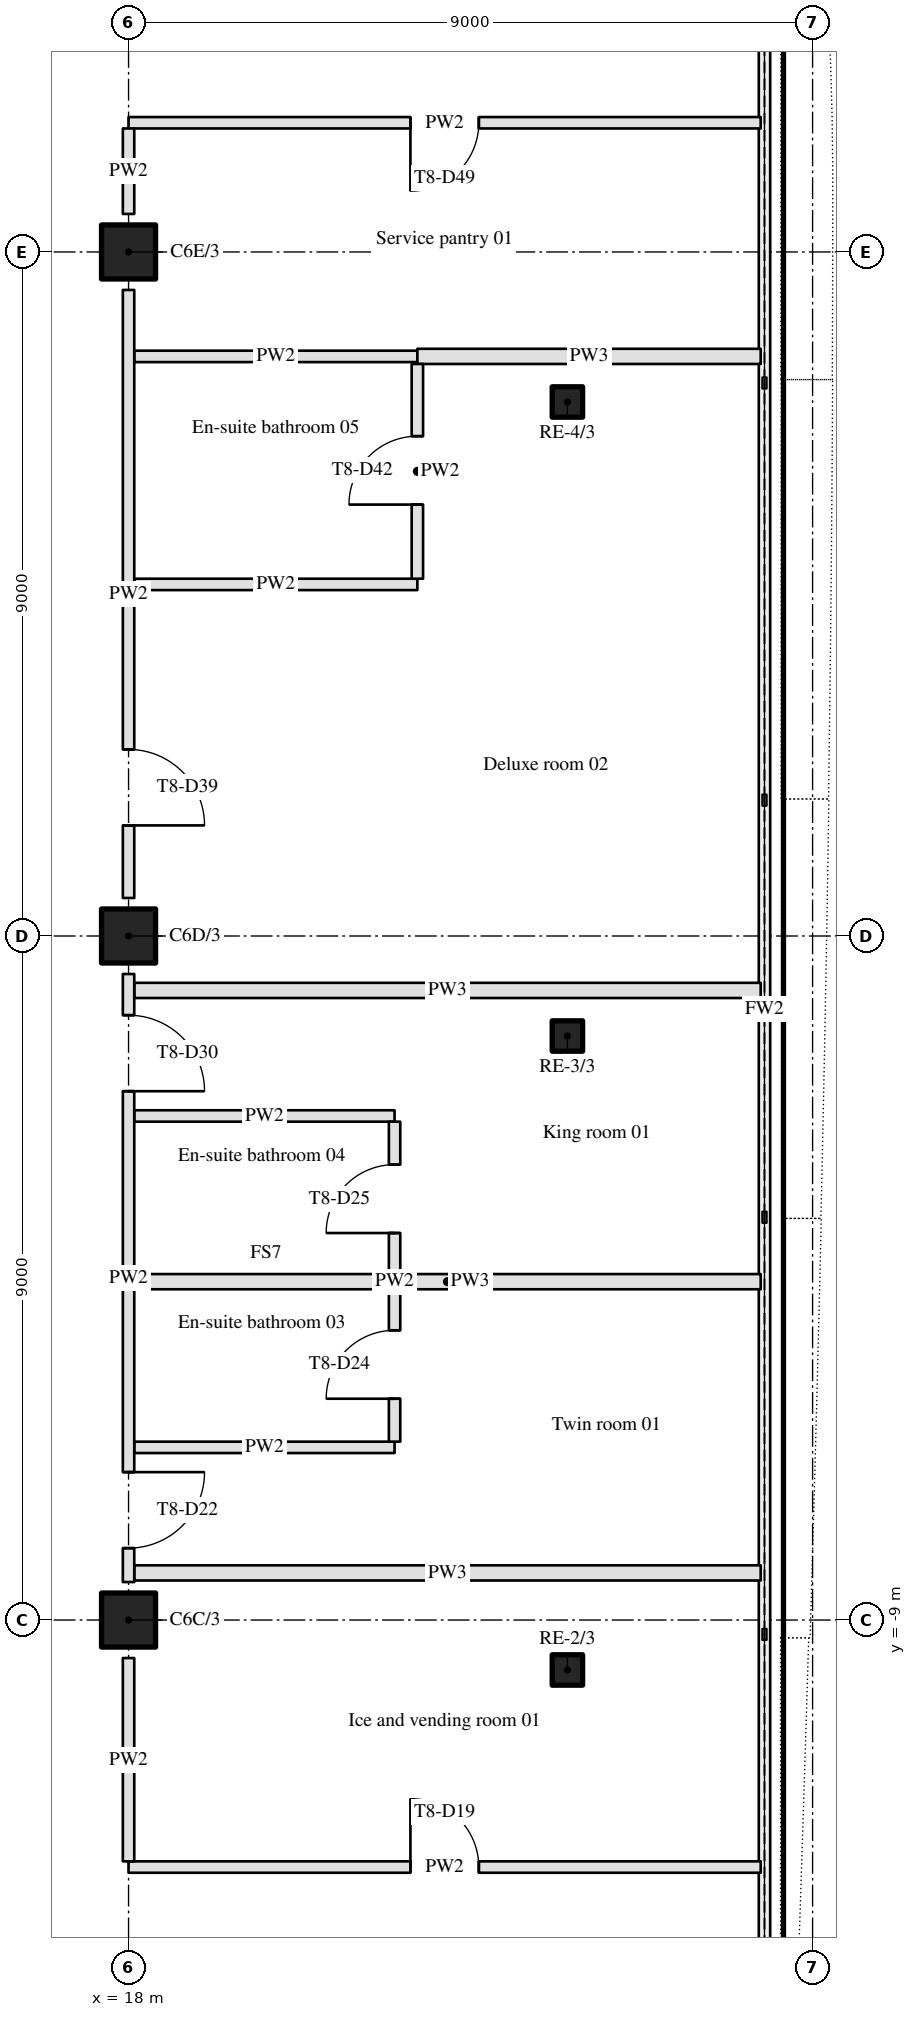
"""IFC4 building model, lengths in metres.
Left out: names, types, materials, properties, quantities, classifications, styles, units other than length and angle.
Written with IfcOpenShell. Run it as: python <this file> out.ifc"""

import sys

from ifc_helpers import new_model, si_unit, direction, frame, frame_2d, origin, origin_2d, place, context, subcontext, project, spatial, rectangle, hollow_rectangle, hollow_circle, extrude, element, fill, save


model = new_model("IFC4")
c1 = context("Model", 3, precision=1e-05, world=origin(), true_north=direction((0.0, 1.0)))
c2 = subcontext(c1, "Body", "Model", "MODEL_VIEW")
j1 = project(units=[si_unit("LENGTHUNIT", "METRE"), si_unit("PLANEANGLEUNIT", "RADIAN")], contexts=[c1])
p1 = place(None, origin())
s1 = spatial("IfcSite", under=j1, at=p1, CompositionType="ELEMENT")
p2 = place(p1, origin())
s2 = spatial("IfcBuilding", under=s1, at=p2, CompositionType="ELEMENT")
p3 = place(p2, frame((0.0, 0.0, 121.5)))
s3 = spatial("IfcBuildingStorey", under=s2, at=p3, CompositionType="ELEMENT", Elevation=121.5)
for number, where, z_axis, x_axis in (
    (1, (18.0, -9.0, 0.0), (0.0, 0.0, 1.0), (1.0, 0.0, 0.0)),
    (2, (18.0, 0.0, 0.0), (0.0, 0.0, 1.0), (1.0, 0.0, 0.0)),
    (3, (18.0, 9.0, 0.0), (0.0, 0.0, 1.0), (1.0, 0.0, 0.0)),
):
    element("IfcColumn", number, at=place(p3, frame(where, z_axis=z_axis, x_axis=x_axis)), inside=s3, PredefinedType="COLUMN", context=c2, shape_type="SweptSolid", body=[
        extrude(hollow_circle(Radius=0.355, WallThickness=0.032, at=origin_2d()), origin(), (0.0, 0.0, 1.0), 3.4),
    ])
for number, where, z_axis, x_axis in (
    (4, (23.774, -9.657, 0.0), (0.0, 0.0, 1.0), (1.0, 0.0, 0.0)),
    (5, (23.774, -1.316, 0.0), (0.0, 0.0, 1.0), (1.0, 0.0, 0.0)),
    (6, (23.774, 7.026, 0.0), (0.0, 0.0, 1.0), (1.0, 0.0, 0.0)),
):
    element("IfcColumn", number, at=place(p3, frame(where, z_axis=z_axis, x_axis=x_axis)), inside=s3, PredefinedType="COLUMN", context=c2, shape_type="SweptSolid", body=[
        extrude(hollow_rectangle(XDim=0.4, YDim=0.4, WallThickness=0.02, InnerFilletRadius=0.03, OuterFilletRadius=0.05, at=origin_2d()), origin(), (0.0, 0.0, 1.0), 3.4),
    ])
p4 = place(p3, frame((18.0, -12.25, 0.0), z_axis=(0.0, 0.0, 1.0), x_axis=(1.0, 0.0, 0.0)))
e7 = element("IfcWall", 7, at=p4, inside=s3, PredefinedType="PARTITIONING", context=c2, shape_type="SweptSolid", body=[
    extrude(rectangle(XDim=8.317, YDim=0.15, at=frame_2d((4.158, 0.0))), origin(), (0.0, 0.0, 1.0), 2.46),
])
p5 = place(p4, frame((3.708, 0.0, 0.0)))
e8 = element("IfcOpeningElement", 8, at=p5, cuts=e7, PredefinedType="OPENING", context=c2, shape_type="SweptSolid", body=[
    extrude(rectangle(XDim=0.9, YDim=2.1, at=frame_2d((0.45, 1.05))), frame((0.0, 0.085, 0.0), z_axis=(0.0, -1.0, 0.0), x_axis=(1.0, 0.0, 0.0)), (0.0, 0.0, 1.0), 0.17),
])
p6 = place(p3, frame((18.075, -8.38, 0.0), z_axis=(0.0, 0.0, 1.0), x_axis=(1.0, 0.0, 0.0)))
e9 = element("IfcWall", 9, at=p6, inside=s3, PredefinedType="PARTITIONING", context=c2, shape_type="SweptSolid", body=[
    extrude(rectangle(XDim=8.242, YDim=0.2, at=frame_2d((4.121, 0.0))), origin(), (0.0, 0.0, 1.0), 2.46),
])
p7 = place(p3, frame((18.075, -6.728, 0.0), z_axis=(0.0, 0.0, 1.0), x_axis=(1.0, 0.0, 0.0)))
e10 = element("IfcWall", 10, at=p7, inside=s3, PredefinedType="PARTITIONING", context=c2, shape_type="SweptSolid", body=[
    extrude(rectangle(XDim=3.425, YDim=0.15, at=frame_2d((1.712, 0.0))), origin(), (0.0, 0.0, 1.0), 2.46),
])
p8 = place(p3, frame((18.075, -4.548, 0.0), z_axis=(0.0, 0.0, 1.0), x_axis=(1.0, 0.0, 0.0)))
e11 = element("IfcWall", 11, at=p8, inside=s3, PredefinedType="PARTITIONING", context=c2, shape_type="SweptSolid", body=[
    extrude(rectangle(XDim=8.242, YDim=0.2, at=frame_2d((4.121, 0.0))), origin(), (0.0, 0.0, 1.0), 2.46),
])
p9 = place(p3, frame((18.075, -2.368, 0.0), z_axis=(0.0, 0.0, 1.0), x_axis=(1.0, 0.0, 0.0)))
e12 = element("IfcWall", 12, at=p9, inside=s3, PredefinedType="PARTITIONING", context=c2, shape_type="SweptSolid", body=[
    extrude(rectangle(XDim=3.425, YDim=0.15, at=frame_2d((1.712, 0.0))), origin(), (0.0, 0.0, 1.0), 2.46),
])
p10 = place(p3, frame((18.075, -0.716, 0.0), z_axis=(0.0, 0.0, 1.0), x_axis=(1.0, 0.0, 0.0)))
e13 = element("IfcWall", 13, at=p10, inside=s3, PredefinedType="PARTITIONING", context=c2, shape_type="SweptSolid", body=[
    extrude(rectangle(XDim=8.242, YDim=0.2, at=frame_2d((4.121, 0.0))), origin(), (0.0, 0.0, 1.0), 2.46),
])
for number, where, z_axis, x_axis in (
    (14, (18.075, 4.626, 0.0), (0.0, 0.0, 1.0), (1.0, 0.0, 0.0)),
    (15, (18.075, 7.626, 0.0), (0.0, 0.0, 1.0), (1.0, 0.0, 0.0)),
):
    element("IfcWall", number, at=place(p3, frame(where, z_axis=z_axis, x_axis=x_axis)), inside=s3, PredefinedType="PARTITIONING", context=c2, shape_type="SweptSolid", body=[
        extrude(rectangle(XDim=3.725, YDim=0.15, at=frame_2d((1.863, 0.0))), origin(), (0.0, 0.0, 1.0), 2.46),
    ])
p11 = place(p3, frame((21.8, 7.626, 0.0), z_axis=(0.0, 0.0, 1.0), x_axis=(1.0, 0.0, 0.0)))
e16 = element("IfcWall", 16, at=p11, inside=s3, PredefinedType="PARTITIONING", context=c2, shape_type="SweptSolid", body=[
    extrude(rectangle(XDim=4.517, YDim=0.2, at=frame_2d((2.258, 0.0))), origin(), (0.0, 0.0, 1.0), 2.46),
])
p12 = place(p3, frame((26.317, 10.7, 0.0), z_axis=(0.0, 0.0, 1.0), x_axis=(-1.0, 0.0, 0.0)))
e17 = element("IfcWall", 17, at=p12, inside=s3, PredefinedType="PARTITIONING", context=c2, shape_type="SweptSolid", body=[
    extrude(rectangle(XDim=8.317, YDim=0.15, at=frame_2d((4.158, 0.0))), origin(), (0.0, 0.0, 1.0), 2.46),
])
p13 = place(p12, frame((3.708, 0.0, 0.0)))
e18 = element("IfcOpeningElement", 18, at=p13, cuts=e17, PredefinedType="OPENING", context=c2, shape_type="SweptSolid", body=[
    extrude(rectangle(XDim=0.9, YDim=2.1, at=frame_2d((0.45, 1.05))), frame((0.0, 0.085, 0.0), z_axis=(0.0, -1.0, 0.0), x_axis=(1.0, 0.0, 0.0)), (0.0, 0.0, 1.0), 0.17),
])
p14 = place(p3, frame((18.0, -12.175, 0.0), z_axis=(0.0, 0.0, 1.0), x_axis=(0.0, 1.0, 0.0)))
e19 = element("IfcWall", 19, at=p14, inside=s3, PredefinedType="PARTITIONING", context=c2, shape_type="SweptSolid", body=[
    extrude(rectangle(XDim=2.675, YDim=0.15, at=frame_2d((1.337, 0.0))), origin(), (0.0, 0.0, 1.0), 2.46),
])
p15 = place(p3, frame((18.0, -0.5, 0.0), z_axis=(0.0, 0.0, 1.0), x_axis=(0.0, -1.0, 0.0)))
e20 = element("IfcWall", 20, at=p15, inside=s3, PredefinedType="PARTITIONING", context=c2, shape_type="SweptSolid", body=[
    extrude(rectangle(XDim=8.0, YDim=0.15, at=frame_2d((4.0, 0.0))), origin(), (0.0, 0.0, 1.0), 2.46),
])
p16 = place(p15, frame((6.554, 0.0, 0.0)))
e21 = element("IfcOpeningElement", 21, at=p16, cuts=e20, PredefinedType="OPENING", context=c2, shape_type="SweptSolid", body=[
    extrude(rectangle(XDim=1.0, YDim=2.1, at=frame_2d((0.5, 1.05))), frame((0.0, 0.085, 0.0), z_axis=(0.0, -1.0, 0.0), x_axis=(1.0, 0.0, 0.0)), (0.0, 0.0, 1.0), 0.17),
])
p17 = place(p15, frame((0.542, 0.0, 0.0)))
e22 = element("IfcOpeningElement", 22, at=p17, cuts=e20, PredefinedType="OPENING", context=c2, shape_type="SweptSolid", body=[
    extrude(rectangle(XDim=1.0, YDim=2.1, at=frame_2d((0.5, 1.05))), frame((0.0, 0.085, 0.0), z_axis=(0.0, -1.0, 0.0), x_axis=(1.0, 0.0, 0.0)), (0.0, 0.0, 1.0), 0.17),
])
p18 = place(p3, frame((18.0, 8.5, 0.0), z_axis=(0.0, 0.0, 1.0), x_axis=(0.0, -1.0, 0.0)))
e23 = element("IfcWall", 23, at=p18, inside=s3, PredefinedType="PARTITIONING", context=c2, shape_type="SweptSolid", body=[
    extrude(rectangle(XDim=8.0, YDim=0.15, at=frame_2d((4.0, 0.0))), origin(), (0.0, 0.0, 1.0), 2.46),
])
p19 = place(p18, frame((6.045, 0.0, 0.0)))
e24 = element("IfcOpeningElement", 24, at=p19, cuts=e23, PredefinedType="OPENING", context=c2, shape_type="SweptSolid", body=[
    extrude(rectangle(XDim=1.0, YDim=2.1, at=frame_2d((0.5, 1.05))), frame((0.0, 0.085, 0.0), z_axis=(0.0, -1.0, 0.0), x_axis=(1.0, 0.0, 0.0)), (0.0, 0.0, 1.0), 0.17),
])
p20 = place(p3, frame((18.0, 9.5, 0.0), z_axis=(0.0, 0.0, 1.0), x_axis=(0.0, 1.0, 0.0)))
e25 = element("IfcWall", 25, at=p20, inside=s3, PredefinedType="PARTITIONING", context=c2, shape_type="SweptSolid", body=[
    extrude(rectangle(XDim=1.125, YDim=0.15, at=frame_2d((0.562, 0.0))), origin(), (0.0, 0.0, 1.0), 2.46),
])
p21 = place(p3, frame((21.5, -6.653, 0.0), z_axis=(0.0, 0.0, 1.0), x_axis=(0.0, 1.0, 0.0)))
e26 = element("IfcWall", 26, at=p21, inside=s3, PredefinedType="PARTITIONING", context=c2, shape_type="SweptSolid", body=[
    extrude(rectangle(XDim=4.21, YDim=0.15, at=frame_2d((2.105, 0.0))), origin(), (0.0, 0.0, 1.0), 2.46),
])
p22 = place(p21, frame((0.565, 0.0, 0.0)))
e27 = element("IfcOpeningElement", 27, at=p22, cuts=e26, PredefinedType="OPENING", context=c2, shape_type="SweptSolid", body=[
    extrude(rectangle(XDim=0.9, YDim=2.1, at=frame_2d((0.45, 1.05))), frame((0.0, 0.085, 0.0), z_axis=(0.0, -1.0, 0.0), x_axis=(1.0, 0.0, 0.0)), (0.0, 0.0, 1.0), 0.17),
])
p23 = place(p21, frame((2.745, 0.0, 0.0)))
e28 = element("IfcOpeningElement", 28, at=p23, cuts=e26, PredefinedType="OPENING", context=c2, shape_type="SweptSolid", body=[
    extrude(rectangle(XDim=0.9, YDim=2.1, at=frame_2d((0.45, 1.05))), frame((0.0, 0.085, 0.0), z_axis=(0.0, -1.0, 0.0), x_axis=(1.0, 0.0, 0.0)), (0.0, 0.0, 1.0), 0.17),
])
p24 = place(p3, frame((21.8, 4.701, 0.0), z_axis=(0.0, 0.0, 1.0), x_axis=(0.0, 1.0, 0.0)))
e29 = element("IfcWall", 29, at=p24, inside=s3, PredefinedType="PARTITIONING", context=c2, shape_type="SweptSolid", body=[
    extrude(rectangle(XDim=2.825, YDim=0.15, at=frame_2d((1.413, 0.0))), origin(), (0.0, 0.0, 1.0), 2.46),
])
p25 = place(p24, frame((0.975, 0.0, 0.0)))
e30 = element("IfcOpeningElement", 30, at=p25, cuts=e29, PredefinedType="OPENING", context=c2, shape_type="SweptSolid", body=[
    extrude(rectangle(XDim=0.9, YDim=2.1, at=frame_2d((0.45, 1.05))), frame((0.0, 0.085, 0.0), z_axis=(0.0, -1.0, 0.0), x_axis=(1.0, 0.0, 0.0)), (0.0, 0.0, 1.0), 0.17),
])
p26 = place(p5, origin())
e31 = element("IfcDoor", 31, at=p26, inside=s3, OperationType="SINGLE_SWING_LEFT", PredefinedType="DOOR", context=c2, shape_type="SweptSolid", body=[
    extrude(rectangle(XDim=0.9, YDim=2.1, at=frame_2d((0.45, 1.05))), frame((0.0, 0.025, 0.0), z_axis=(0.0, -1.0, 0.0), x_axis=(1.0, 0.0, 0.0)), (0.0, 0.0, 1.0), 0.05),
])
fill(e8, e31)
p27 = place(p16, origin())
e32 = element("IfcDoor", 32, at=p27, inside=s3, OperationType="SINGLE_SWING_LEFT", PredefinedType="DOOR", context=c2, shape_type="SweptSolid", body=[
    extrude(rectangle(XDim=1.0, YDim=2.1, at=frame_2d((0.5, 1.05))), frame((0.0, 0.025, 0.0), z_axis=(0.0, -1.0, 0.0), x_axis=(1.0, 0.0, 0.0)), (0.0, 0.0, 1.0), 0.05),
])
fill(e21, e32)
p28 = place(p17, origin())
e33 = element("IfcDoor", 33, at=p28, inside=s3, OperationType="SINGLE_SWING_RIGHT", PredefinedType="DOOR", context=c2, shape_type="SweptSolid", body=[
    extrude(rectangle(XDim=1.0, YDim=2.1, at=frame_2d((0.5, 1.05))), frame((0.0, 0.025, 0.0), z_axis=(0.0, -1.0, 0.0), x_axis=(1.0, 0.0, 0.0)), (0.0, 0.0, 1.0), 0.05),
])
fill(e22, e33)
p29 = place(p19, origin())
e34 = element("IfcDoor", 34, at=p29, inside=s3, OperationType="SINGLE_SWING_RIGHT", PredefinedType="DOOR", context=c2, shape_type="SweptSolid", body=[
    extrude(rectangle(XDim=1.0, YDim=2.1, at=frame_2d((0.5, 1.05))), frame((0.0, 0.025, 0.0), z_axis=(0.0, -1.0, 0.0), x_axis=(1.0, 0.0, 0.0)), (0.0, 0.0, 1.0), 0.05),
])
fill(e24, e34)
p30 = place(p13, origin())
e35 = element("IfcDoor", 35, at=p30, inside=s3, OperationType="SINGLE_SWING_RIGHT", PredefinedType="DOOR", context=c2, shape_type="SweptSolid", body=[
    extrude(rectangle(XDim=0.9, YDim=2.1, at=frame_2d((0.45, 1.05))), frame((0.0, 0.025, 0.0), z_axis=(0.0, -1.0, 0.0), x_axis=(1.0, 0.0, 0.0)), (0.0, 0.0, 1.0), 0.05),
])
fill(e18, e35)
p31 = place(p22, origin())
e36 = element("IfcDoor", 36, at=p31, inside=s3, OperationType="SINGLE_SWING_LEFT", PredefinedType="DOOR", context=c2, shape_type="SweptSolid", body=[
    extrude(rectangle(XDim=0.9, YDim=2.1, at=frame_2d((0.45, 1.05))), frame((0.0, 0.025, 0.0), z_axis=(0.0, -1.0, 0.0), x_axis=(1.0, 0.0, 0.0)), (0.0, 0.0, 1.0), 0.05),
])
fill(e27, e36)
p32 = place(p23, origin())
e37 = element("IfcDoor", 37, at=p32, inside=s3, OperationType="SINGLE_SWING_LEFT", PredefinedType="DOOR", context=c2, shape_type="SweptSolid", body=[
    extrude(rectangle(XDim=0.9, YDim=2.1, at=frame_2d((0.45, 1.05))), frame((0.0, 0.025, 0.0), z_axis=(0.0, -1.0, 0.0), x_axis=(1.0, 0.0, 0.0)), (0.0, 0.0, 1.0), 0.05),
])
fill(e28, e37)
p33 = place(p25, origin())
e38 = element("IfcDoor", 38, at=p33, inside=s3, OperationType="SINGLE_SWING_LEFT", PredefinedType="DOOR", context=c2, shape_type="SweptSolid", body=[
    extrude(rectangle(XDim=0.9, YDim=2.1, at=frame_2d((0.45, 1.05))), frame((0.0, 0.025, 0.0), z_axis=(0.0, -1.0, 0.0), x_axis=(1.0, 0.0, 0.0)), (0.0, 0.0, 1.0), 0.05),
])
fill(e30, e38)
save(model, sys.argv[1])
